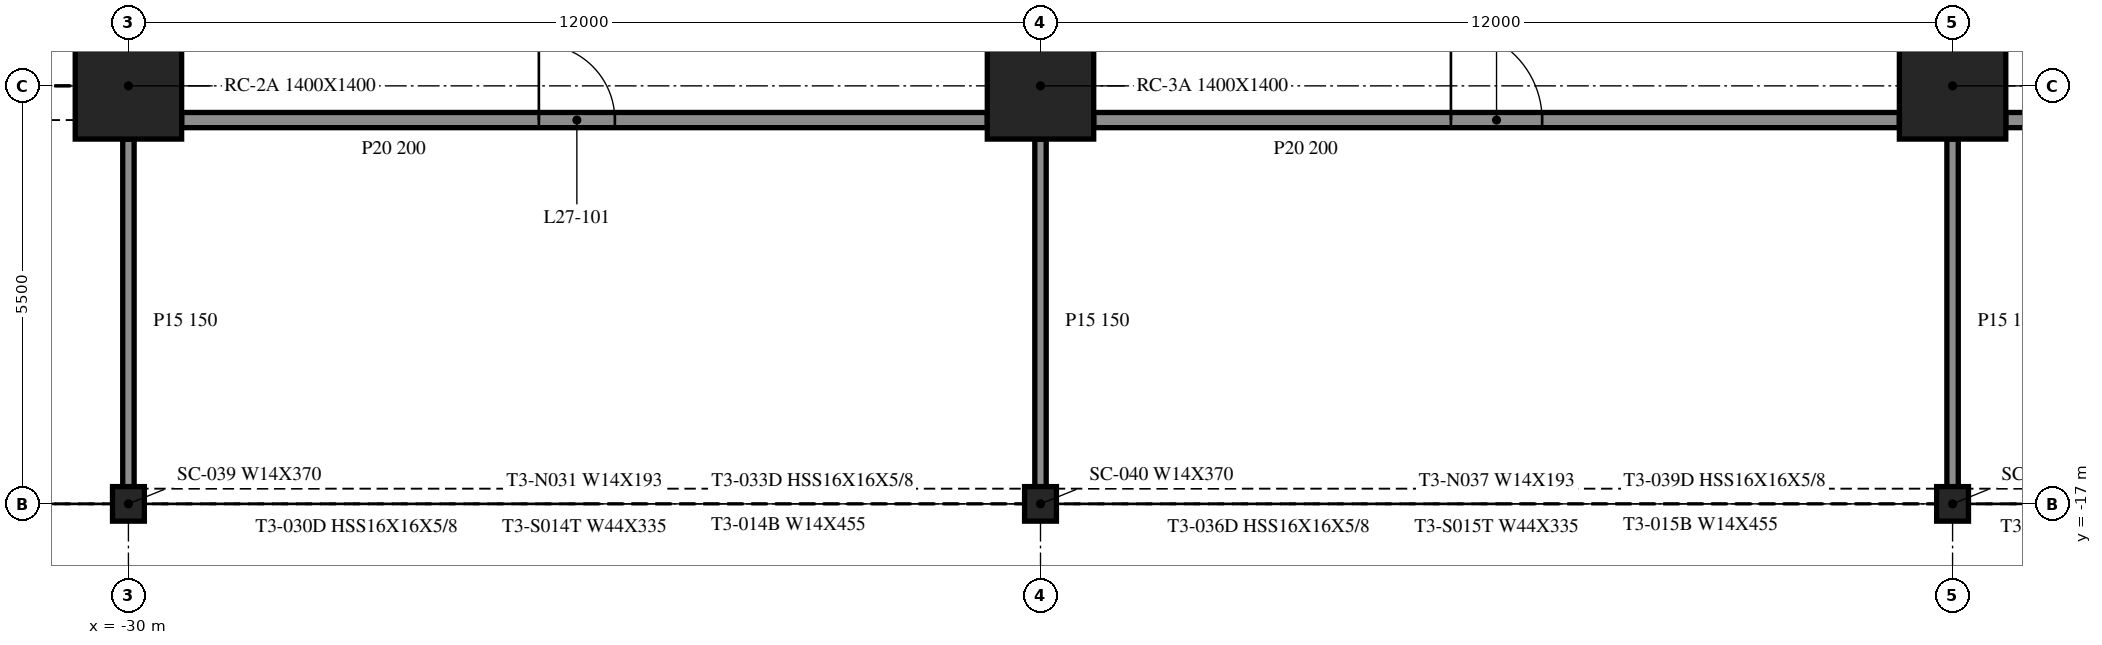
"""IFC4 building model, lengths in metres.
Left out: names, types, materials, properties, quantities, classifications, styles, units other than length and angle.
Written with IfcOpenShell. Run it as: python <this file> out.ifc"""

import sys

from ifc_helpers import new_model, si_unit, direction, frame, frame_2d, origin, origin_2d, place, context, subcontext, project, spatial, rectangle, i_section, extrude, element, fill, save


model = new_model("IFC4")
c1 = context("Model", 3, precision=1e-05, world=origin(), true_north=direction((0.0, 1.0)))
c2 = subcontext(c1, "Body", "Model", "MODEL_VIEW")
j1 = project(units=[si_unit("LENGTHUNIT", "METRE"), si_unit("PLANEANGLEUNIT", "RADIAN")], contexts=[c1])
p1 = place(None, origin())
s1 = spatial("IfcSite", under=j1, at=p1, CompositionType="ELEMENT")
p2 = place(p1, origin())
s2 = spatial("IfcBuilding", under=s1, at=p2, CompositionType="ELEMENT")
p3 = place(p2, frame((0.0, 0.0, 117.6)))
s3 = spatial("IfcBuildingStorey", under=s2, at=p3, CompositionType="ELEMENT", Elevation=117.6)
for number, where, z_axis, x_axis in (
    (1, (-30.0, -11.5, -0.55), (0.0, 0.0, 1.0), (1.0, 0.0, 0.0)),
    (2, (-18.0, -11.5, -0.55), (0.0, 0.0, 1.0), (1.0, 0.0, 0.0)),
    (3, (-6.0, -11.5, -0.55), (0.0, 0.0, 1.0), (1.0, 0.0, 0.0)),
):
    element("IfcColumn", number, at=place(p3, frame(where, z_axis=z_axis, x_axis=x_axis)), inside=s3, PredefinedType="COLUMN", context=c2, shape_type="SweptSolid", body=[
        extrude(rectangle(XDim=1.4, YDim=1.4, at=origin_2d()), origin(), (0.0, 0.0, 1.0), 4.61),
    ])
for number, where, z_axis, x_axis in (
    (4, (-30.0, -17.0, -0.55), (0.0, 0.0, 1.0), (1.0, 0.0, 0.0)),
    (5, (-18.0, -17.0, -0.55), (0.0, 0.0, 1.0), (1.0, 0.0, 0.0)),
    (6, (-6.0, -17.0, -0.55), (0.0, 0.0, 1.0), (1.0, 0.0, 0.0)),
):
    element("IfcColumn", number, at=place(p3, frame(where, z_axis=z_axis, x_axis=x_axis)), inside=s3, PredefinedType="COLUMN", context=c2, shape_type="SweptSolid", body=[
        extrude(i_section(OverallWidth=0.419, OverallDepth=0.455, WebThickness=0.042, FlangeThickness=0.068, at=origin_2d()), origin(), (0.0, 0.0, 1.0), 4.61),
    ])
p4 = place(p3, frame((-29.3, -11.95, 0.0), z_axis=(0.0, 0.0, 1.0), x_axis=(1.0, 0.0, 0.0)))
e7 = element("IfcWall", 7, at=p4, inside=s3, PredefinedType="PARTITIONING", context=c2, shape_type="SweptSolid", body=[
    extrude(rectangle(XDim=10.6, YDim=0.2, at=frame_2d((5.3, 0.0))), origin(), (0.0, 0.0, 1.0), 4.06),
])
p5 = place(p4, frame((4.7, 0.0, 0.0)))
e8 = element("IfcOpeningElement", 8, at=p5, cuts=e7, PredefinedType="OPENING", context=c2, shape_type="SweptSolid", body=[
    extrude(rectangle(XDim=1.0, YDim=2.1, at=frame_2d((0.5, 1.05))), frame((0.0, 0.11, 0.0), z_axis=(0.0, -1.0, 0.0), x_axis=(1.0, 0.0, 0.0)), (0.0, 0.0, 1.0), 0.22),
])
p6 = place(p3, frame((-17.3, -11.95, 0.0), z_axis=(0.0, 0.0, 1.0), x_axis=(1.0, 0.0, 0.0)))
e9 = element("IfcWall", 9, at=p6, inside=s3, PredefinedType="PARTITIONING", context=c2, shape_type="SweptSolid", body=[
    extrude(rectangle(XDim=10.6, YDim=0.2, at=frame_2d((5.3, 0.0))), origin(), (0.0, 0.0, 1.0), 4.06),
])
p7 = place(p6, frame((4.7, 0.0, 0.0)))
e10 = element("IfcOpeningElement", 10, at=p7, cuts=e9, PredefinedType="OPENING", context=c2, shape_type="SweptSolid", body=[
    extrude(rectangle(XDim=1.2, YDim=2.1, at=frame_2d((0.6, 1.05))), frame((0.0, 0.11, 0.0), z_axis=(0.0, -1.0, 0.0), x_axis=(1.0, 0.0, 0.0)), (0.0, 0.0, 1.0), 0.22),
])
p8 = place(p3, frame((-5.3, -11.95, 0.0), z_axis=(0.0, 0.0, 1.0), x_axis=(1.0, 0.0, 0.0)))
e11 = element("IfcWall", 11, at=p8, inside=s3, PredefinedType="PARTITIONING", context=c2, shape_type="SweptSolid", body=[
    extrude(rectangle(XDim=10.6, YDim=0.2, at=frame_2d((5.3, 0.0))), origin(), (0.0, 0.0, 1.0), 4.06),
])
p9 = place(p8, frame((4.7, 0.0, 0.0)))
e12 = element("IfcOpeningElement", 12, at=p9, cuts=e11, PredefinedType="OPENING", context=c2, shape_type="SweptSolid", body=[
    extrude(rectangle(XDim=1.2, YDim=2.1, at=frame_2d((0.6, 1.05))), frame((0.0, 0.11, 0.0), z_axis=(0.0, -1.0, 0.0), x_axis=(1.0, 0.0, 0.0)), (0.0, 0.0, 1.0), 0.22),
])
for number, where, z_axis, x_axis in (
    (13, (-30.0, -17.0, 0.0), (0.0, 0.0, 1.0), (0.0, 1.0, 0.0)),
    (14, (-18.0, -17.0, 0.0), (0.0, 0.0, 1.0), (0.0, 1.0, 0.0)),
    (15, (-6.0, -17.0, 0.0), (0.0, 0.0, 1.0), (0.0, 1.0, 0.0)),
):
    element("IfcWall", number, at=place(p3, frame(where, z_axis=z_axis, x_axis=x_axis)), inside=s3, PredefinedType="PARTITIONING", context=c2, shape_type="SweptSolid", body=[
        extrude(rectangle(XDim=4.8, YDim=0.15, at=frame_2d((2.4, 0.0))), origin(), (0.0, 0.0, 1.0), 4.06),
    ])
p10 = place(p5, origin())
e16 = element("IfcDoor", 16, at=p10, inside=s3, OperationType="SINGLE_SWING_RIGHT", PredefinedType="DOOR", context=c2, shape_type="SweptSolid", body=[
    extrude(rectangle(XDim=1.0, YDim=2.1, at=frame_2d((0.5, 1.05))), frame((0.0, 0.025, 0.0), z_axis=(0.0, -1.0, 0.0), x_axis=(1.0, 0.0, 0.0)), (0.0, 0.0, 1.0), 0.05),
])
fill(e8, e16)
p11 = place(p7, origin())
e17 = element("IfcDoor", 17, at=p11, inside=s3, OperationType="SINGLE_SWING_LEFT", PredefinedType="DOOR", context=c2, shape_type="SweptSolid", body=[
    extrude(rectangle(XDim=1.2, YDim=2.1, at=frame_2d((0.6, 1.05))), frame((0.0, 0.025, 0.0), z_axis=(0.0, -1.0, 0.0), x_axis=(1.0, 0.0, 0.0)), (0.0, 0.0, 1.0), 0.05),
])
fill(e10, e17)
save(model, sys.argv[1])
